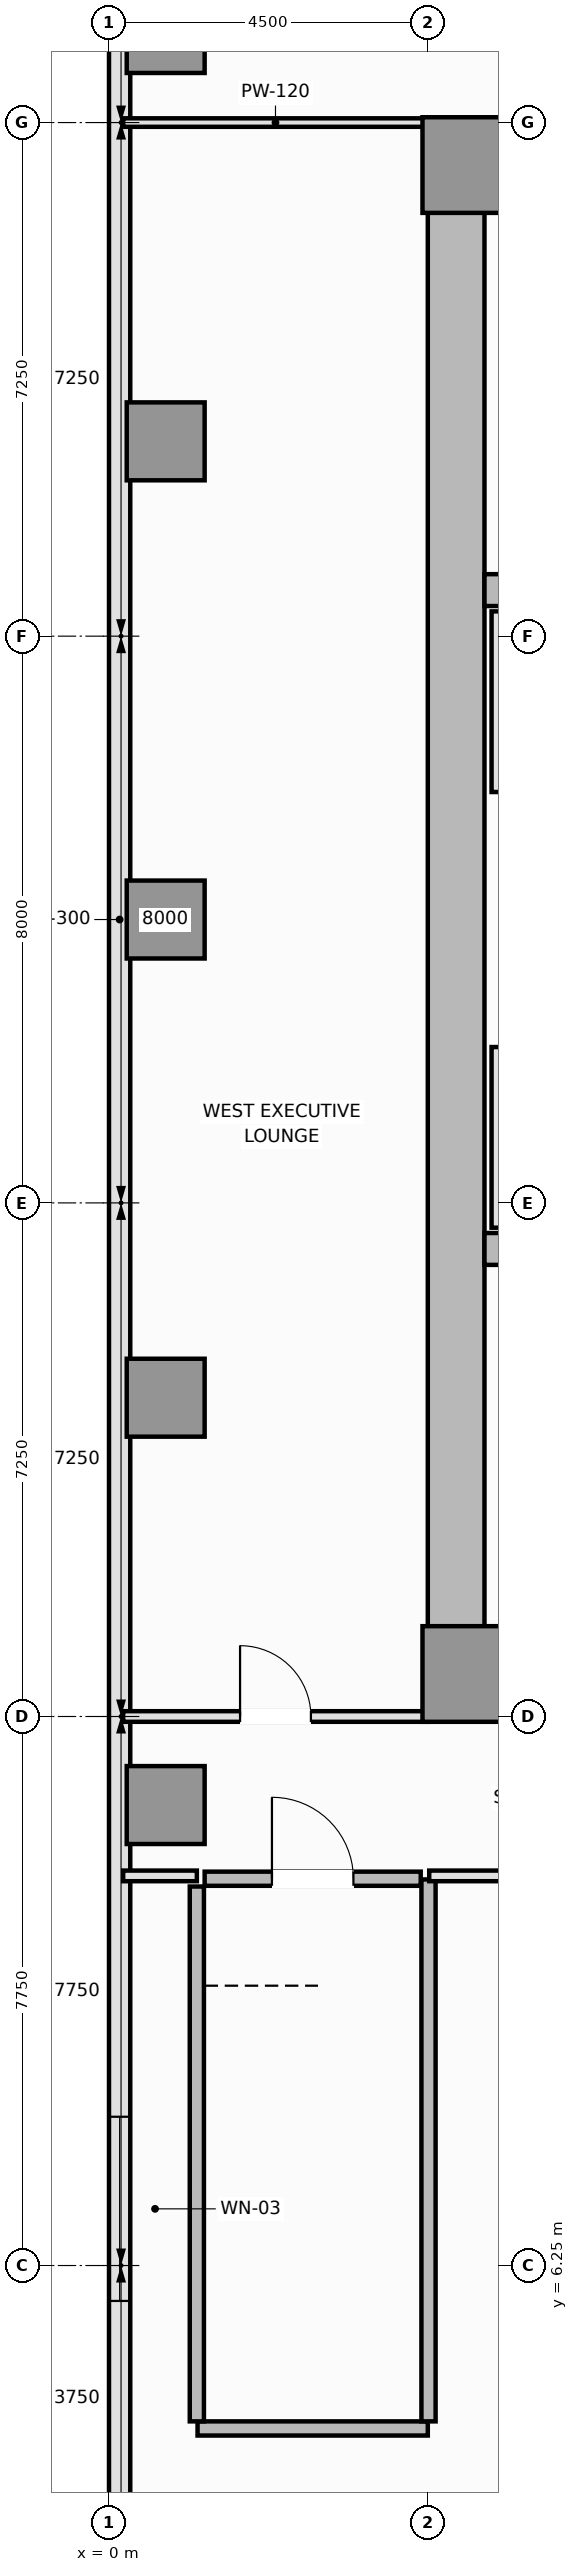
"""IFC4 building model, lengths in metres.
Left out: names, types, materials, properties, quantities, classifications, styles, units other than length and angle.
Written with IfcOpenShell. Run it as: python <this file> out.ifc"""

import sys

from ifc_helpers import new_model, si_unit, direction, frame, frame_2d, origin, origin_2d, place, context, subcontext, project, spatial, rectangle, extrude, element, fill, save


model = new_model("IFC4")
c1 = context("Model", 3, precision=1e-05, world=origin(), true_north=direction((0.0, 1.0)))
c2 = subcontext(c1, "Body", "Model", "MODEL_VIEW")
j1 = project(units=[si_unit("LENGTHUNIT", "METRE"), si_unit("PLANEANGLEUNIT", "RADIAN")], contexts=[c1])
p1 = place(None, origin())
s1 = spatial("IfcSite", under=j1, at=p1, CompositionType="ELEMENT")
p2 = place(p1, origin())
s2 = spatial("IfcBuilding", under=s1, at=p2, CompositionType="ELEMENT")
p3 = place(p2, frame((0.0, 0.0, 20.4)))
s3 = spatial("IfcBuildingStorey", under=s2, at=p3, CompositionType="ELEMENT", Elevation=20.4)
for number, where, z_axis, x_axis in (
    (1, (4.5, 14.4, 0.0), (0.0, 0.0, 1.0), (1.0, 0.0, 0.0)),
    (2, (4.5, 36.1, 0.0), (0.0, 0.0, 1.0), (1.0, 0.0, 0.0)),
):
    element("IfcWall", number, at=place(p3, frame(where, z_axis=z_axis, x_axis=x_axis)), inside=s3, PredefinedType="SHEAR", context=c2, shape_type="SweptSolid", body=[
        extrude(rectangle(XDim=13.5, YDim=0.8, at=frame_2d((6.75, 0.0))), origin(), (0.0, 0.0, 1.0), 5.2),
    ])
p4 = place(p3, frame((4.9, 14.8, 0.0), z_axis=(0.0, 0.0, 1.0), x_axis=(0.0, 1.0, 0.0)))
e3 = element("IfcWall", 3, at=p4, inside=s3, PredefinedType="SHEAR", context=c2, shape_type="SweptSolid", body=[
    extrude(rectangle(XDim=20.9, YDim=0.8, at=frame_2d((10.45, 0.0))), origin(), (0.0, 0.0, 1.0), 5.2),
])
for number, where, z_axis, x_axis in (
    (4, (5.3, 20.6, 0.0), (0.0, 0.0, 1.0), (1.0, 0.0, 0.0)),
    (5, (5.3, 29.9, 0.0), (0.0, 0.0, 1.0), (1.0, 0.0, 0.0)),
):
    element("IfcWall", number, at=place(p3, frame(where, z_axis=z_axis, x_axis=x_axis)), inside=s3, PredefinedType="SHEAR", context=c2, shape_type="SweptSolid", body=[
        extrude(rectangle(XDim=11.9, YDim=0.45, at=frame_2d((5.95, 0.0))), origin(), (0.0, 0.0, 1.0), 5.2),
    ])
for number, where, z_axis, x_axis in (
    (6, (5.1, 14.6, 0.0), (0.0, 0.0, 1.0), (1.0, 0.0, 0.0)),
    (7, (5.1, 35.9, 0.0), (0.0, 0.0, 1.0), (1.0, 0.0, 0.0)),
):
    element("IfcColumn", number, at=place(p3, frame(where, z_axis=z_axis, x_axis=x_axis)), inside=s3, PredefinedType="PILASTER", context=c2, shape_type="SweptSolid", body=[
        extrude(rectangle(XDim=1.35, YDim=1.35, at=origin_2d()), origin(), (0.0, 0.0, 1.0), 5.2),
    ])
for number, where, z_axis, x_axis in (
    (8, (0.8, 12.75, 0.0), (0.0, 0.0, 1.0), (1.0, 0.0, 0.0)),
    (9, (0.8, 18.5, 0.0), (0.0, 0.0, 1.0), (1.0, 0.0, 0.0)),
    (10, (0.8, 25.25, 0.0), (0.0, 0.0, 1.0), (1.0, 0.0, 0.0)),
    (11, (0.8, 32.0, 0.0), (0.0, 0.0, 1.0), (1.0, 0.0, 0.0)),
    (12, (0.8, 37.75, 0.0), (0.0, 0.0, 1.0), (1.0, 0.0, 0.0)),
):
    element("IfcColumn", number, at=place(p3, frame(where, z_axis=z_axis, x_axis=x_axis)), inside=s3, PredefinedType="COLUMN", context=c2, shape_type="SweptSolid", body=[
        extrude(rectangle(XDim=1.1, YDim=1.1, at=origin_2d()), origin(), (0.0, 0.0, 1.0), 5.2),
    ])
p5 = place(p3, frame((0.15, 50.35, 0.0), z_axis=(0.0, 0.0, 1.0), x_axis=(0.0, -1.0, 0.0)))
e13 = element("IfcWall", 13, at=p5, inside=s3, PredefinedType="SOLIDWALL", context=c2, shape_type="SweptSolid", body=[
    extrude(rectangle(XDim=50.2, YDim=0.3, at=frame_2d((25.1, 0.0))), origin(), (0.0, 0.0, 1.0), 5.02),
])
p6 = place(p5, frame((6.5, 0.0, 0.9)))
e14 = element("IfcOpeningElement", 14, at=p6, cuts=e13, PredefinedType="OPENING", context=c2, shape_type="SweptSolid", body=[
    extrude(rectangle(XDim=2.6, YDim=2.2, at=frame_2d((1.3, 1.1))), frame((0.0, 0.16, 0.0), z_axis=(0.0, -1.0, 0.0), x_axis=(1.0, 0.0, 0.0)), (0.0, 0.0, 1.0), 0.32),
])
p7 = place(p5, frame((42.0, 0.0, 0.9)))
e15 = element("IfcOpeningElement", 15, at=p7, cuts=e13, PredefinedType="OPENING", context=c2, shape_type="SweptSolid", body=[
    extrude(rectangle(XDim=2.6, YDim=2.2, at=frame_2d((1.3, 1.1))), frame((0.0, 0.16, 0.0), z_axis=(0.0, -1.0, 0.0), x_axis=(1.0, 0.0, 0.0)), (0.0, 0.0, 1.0), 0.32),
])
p8 = place(p3, frame((1.25, 3.95, 0.0), z_axis=(0.0, 0.0, 1.0), x_axis=(1.0, 0.0, 0.0)))
e16 = element("IfcWall", 16, at=p8, inside=s3, PredefinedType="SOLIDWALL", context=c2, shape_type="SweptSolid", body=[
    extrude(rectangle(XDim=3.25, YDim=0.2, at=frame_2d((1.625, 0.0))), origin(), (0.0, 0.0, 1.0), 5.2),
])
p9 = place(p3, frame((1.24, 4.05, 0.0), z_axis=(0.0, 0.0, 1.0), x_axis=(0.0, 1.0, 0.0)))
e17 = element("IfcWall", 17, at=p9, inside=s3, PredefinedType="SOLIDWALL", context=c2, shape_type="SweptSolid", body=[
    extrude(rectangle(XDim=7.55, YDim=0.2, at=frame_2d((3.775, 0.0))), origin(), (0.0, 0.0, 1.0), 5.2),
])
p10 = place(p3, frame((4.51, 4.05, 0.0), z_axis=(0.0, 0.0, 1.0), x_axis=(0.0, 1.0, 0.0)))
e18 = element("IfcWall", 18, at=p10, inside=s3, PredefinedType="SOLIDWALL", context=c2, shape_type="SweptSolid", body=[
    extrude(rectangle(XDim=7.65, YDim=0.2, at=frame_2d((3.825, 0.0))), origin(), (0.0, 0.0, 1.0), 5.2),
])
p11 = place(p3, frame((1.35, 11.71, 0.0), z_axis=(0.0, 0.0, 1.0), x_axis=(1.0, 0.0, 0.0)))
e19 = element("IfcWall", 19, at=p11, inside=s3, PredefinedType="SOLIDWALL", context=c2, shape_type="SweptSolid", body=[
    extrude(rectangle(XDim=3.05, YDim=0.2, at=frame_2d((1.525, 0.0))), origin(), (0.0, 0.0, 1.0), 5.2),
])
p12 = place(p11, frame((0.95, 0.0, 0.0)))
e20 = element("IfcOpeningElement", 20, at=p12, cuts=e19, PredefinedType="OPENING", context=c2, shape_type="SweptSolid", body=[
    extrude(rectangle(XDim=1.15, YDim=2.15, at=frame_2d((0.575, 1.075))), frame((0.0, 0.11, 0.0), z_axis=(0.0, -1.0, 0.0), x_axis=(1.0, 0.0, 0.0)), (0.0, 0.0, 1.0), 0.22),
])
for number, where, z_axis, x_axis in (
    (21, (5.475, 20.9, 0.0), (0.0, 0.0, 1.0), (0.0, 1.0, 0.0)),
    (22, (5.475, 27.05, 0.0), (0.0, 0.0, 1.0), (0.0, 1.0, 0.0)),
):
    element("IfcWall", number, at=place(p3, frame(where, z_axis=z_axis, x_axis=x_axis)), inside=s3, PredefinedType="PARTITIONING", context=c2, shape_type="SweptSolid", body=[
        extrude(rectangle(XDim=2.55, YDim=0.15, at=frame_2d((1.275, 0.0))), origin(), (0.0, 0.0, 1.0), 5.02),
    ])
p13 = place(p3, frame((0.2, 11.75, 0.0), z_axis=(0.0, 0.0, 1.0), x_axis=(1.0, 0.0, 0.0)))
e23 = element("IfcWall", 23, at=p13, inside=s3, PredefinedType="PARTITIONING", context=c2, shape_type="SweptSolid", body=[
    extrude(rectangle(XDim=1.04, YDim=0.15, at=frame_2d((0.52, 0.0))), origin(), (0.0, 0.0, 1.0), 5.02),
])
p14 = place(p3, frame((4.52, 11.75, 0.0), z_axis=(0.0, 0.0, 1.0), x_axis=(1.0, 0.0, 0.0)))
e24 = element("IfcWall", 24, at=p14, inside=s3, PredefinedType="PARTITIONING", context=c2, shape_type="SweptSolid", body=[
    extrude(rectangle(XDim=20.03, YDim=0.15, at=frame_2d((10.015, 0.0))), origin(), (0.0, 0.0, 1.0), 5.02),
])
p15 = place(p14, frame((9.115, 0.0, 0.0)))
e25 = element("IfcOpeningElement", 25, at=p15, cuts=e24, PredefinedType="OPENING", context=c2, shape_type="SweptSolid", body=[
    extrude(rectangle(XDim=1.8, YDim=2.2, at=frame_2d((0.9, 1.1))), frame((0.0, 0.085, 0.0), z_axis=(0.0, -1.0, 0.0), x_axis=(1.0, 0.0, 0.0)), (0.0, 0.0, 1.0), 0.17),
])
p16 = place(p3, frame((0.2, 14.0, 0.0), z_axis=(0.0, 0.0, 1.0), x_axis=(1.0, 0.0, 0.0)))
e26 = element("IfcWall", 26, at=p16, inside=s3, PredefinedType="PARTITIONING", context=c2, shape_type="SweptSolid", body=[
    extrude(rectangle(XDim=4.3, YDim=0.15, at=frame_2d((2.15, 0.0))), origin(), (0.0, 0.0, 1.0), 5.02),
])
p17 = place(p16, frame((1.65, 0.0, 0.0)))
e27 = element("IfcOpeningElement", 27, at=p17, cuts=e26, PredefinedType="OPENING", context=c2, shape_type="SweptSolid", body=[
    extrude(rectangle(XDim=1.0, YDim=2.15, at=frame_2d((0.5, 1.075))), frame((0.0, 0.085, 0.0), z_axis=(0.0, -1.0, 0.0), x_axis=(1.0, 0.0, 0.0)), (0.0, 0.0, 1.0), 0.17),
])
p18 = place(p3, frame((0.2, 36.5, 0.0), z_axis=(0.0, 0.0, 1.0), x_axis=(1.0, 0.0, 0.0)))
e28 = element("IfcWall", 28, at=p18, inside=s3, PredefinedType="PARTITIONING", context=c2, shape_type="SweptSolid", body=[
    extrude(rectangle(XDim=4.3, YDim=0.12, at=frame_2d((2.15, 0.0))), origin(), (0.0, 0.0, 1.0), 5.02),
])
p19 = place(p7, origin())
e29 = element("IfcWindow", 29, at=p19, inside=s3, PartitioningType="SINGLE_PANEL", PredefinedType="WINDOW", context=c2, shape_type="SweptSolid", body=[
    extrude(rectangle(XDim=2.6, YDim=2.2, at=frame_2d((1.3, 1.1))), frame((0.0, 0.03, 0.0), z_axis=(0.0, -1.0, 0.0), x_axis=(1.0, 0.0, 0.0)), (0.0, 0.0, 1.0), 0.06),
])
fill(e15, e29)
p20 = place(p12, origin())
e30 = element("IfcDoor", 30, at=p20, inside=s3, OperationType="SINGLE_SWING_LEFT", PredefinedType="DOOR", context=c2, shape_type="SweptSolid", body=[
    extrude(rectangle(XDim=1.15, YDim=2.15, at=frame_2d((0.575, 1.075))), frame((0.0, 0.025, 0.0), z_axis=(0.0, -1.0, 0.0), x_axis=(1.0, 0.0, 0.0)), (0.0, 0.0, 1.0), 0.05),
])
fill(e20, e30)
p21 = place(p17, origin())
e31 = element("IfcDoor", 31, at=p21, inside=s3, OperationType="SINGLE_SWING_LEFT", PredefinedType="DOOR", context=c2, shape_type="SweptSolid", body=[
    extrude(rectangle(XDim=1.0, YDim=2.15, at=frame_2d((0.5, 1.075))), frame((0.0, 0.025, 0.0), z_axis=(0.0, -1.0, 0.0), x_axis=(1.0, 0.0, 0.0)), (0.0, 0.0, 1.0), 0.05),
])
fill(e27, e31)
save(model, sys.argv[1])
